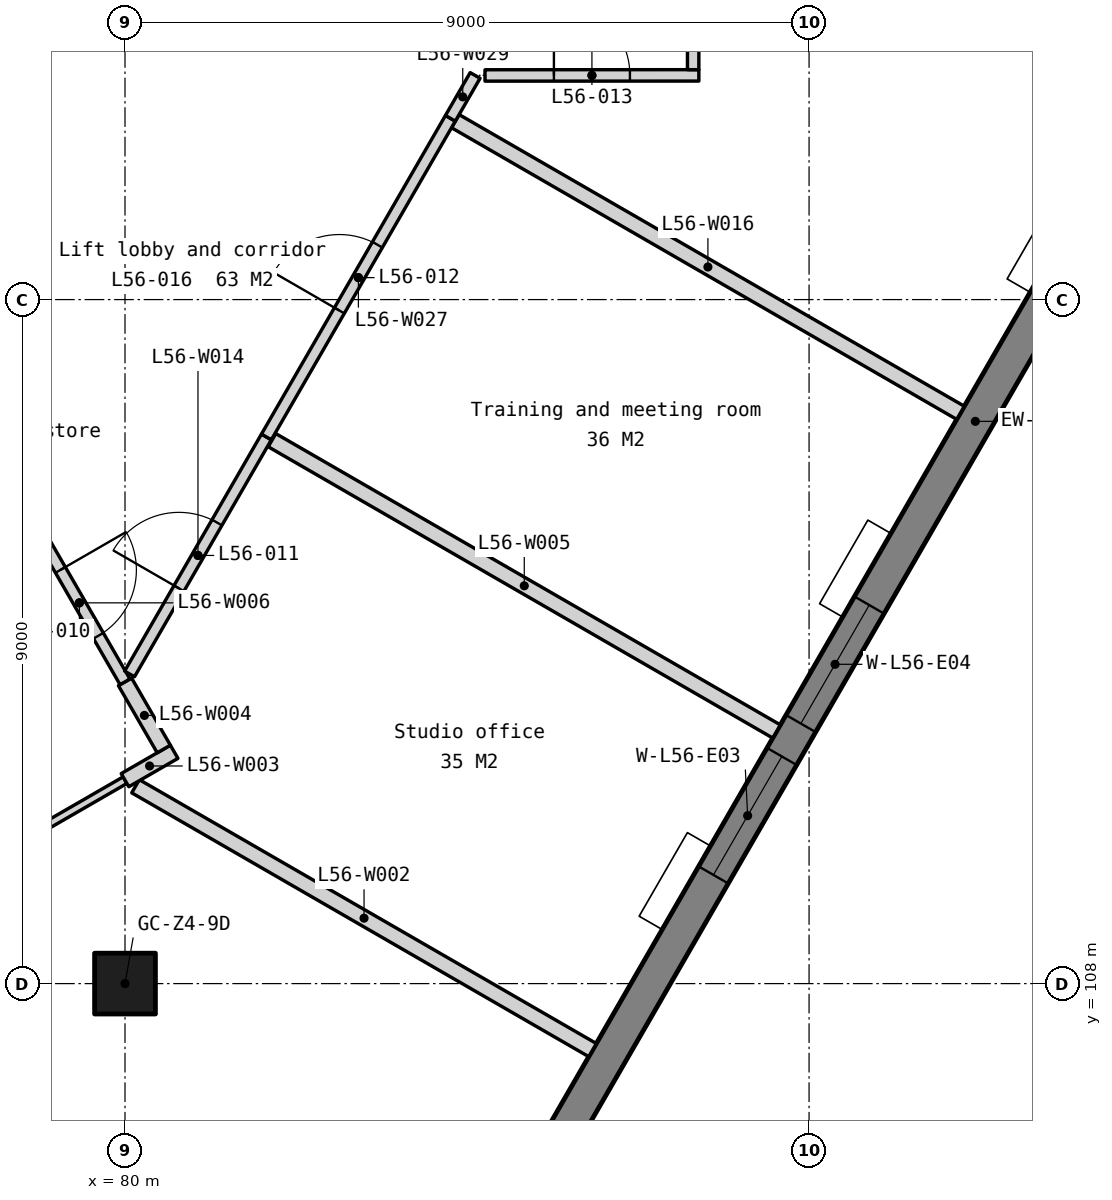
"""IFC4 building model, lengths in metres.
Left out: names, types, materials, properties, quantities, classifications, styles, units other than length and angle.
Written with IfcOpenShell. Run it as: python <this file> out.ifc"""

import sys

from ifc_helpers import new_model, si_unit, direction, frame, frame_2d, origin, origin_2d, place, context, subcontext, project, spatial, polyline, rectangle, outline, extrude, element, fill, save


model = new_model("IFC4")
c1 = context("Model", 3, precision=1e-05, world=origin(), true_north=direction((0.0, 1.0)))
c2 = subcontext(c1, "Body", "Model", "MODEL_VIEW")
j1 = project(units=[si_unit("LENGTHUNIT", "METRE"), si_unit("PLANEANGLEUNIT", "RADIAN")], contexts=[c1])
p1 = place(None, origin())
s1 = spatial("IfcSite", under=j1, at=p1, CompositionType="ELEMENT")
p2 = place(p1, origin())
s2 = spatial("IfcBuilding", under=s1, at=p2, CompositionType="ELEMENT")
p3 = place(p2, frame((0.0, 0.0, 223.1)))
s3 = spatial("IfcBuildingStorey", under=s2, at=p3, CompositionType="ELEMENT", Elevation=223.1)
p4 = place(p3, frame((80.0, 108.0, 0.0), z_axis=(0.0, 0.0, 1.0), x_axis=(1.0, 0.0, 0.0)))
e1 = element("IfcColumn", 1, at=p4, inside=s3, PredefinedType="COLUMN", context=c2, shape_type="SweptSolid", body=[
    extrude(rectangle(XDim=0.8, YDim=0.8, at=origin_2d()), origin(), (0.0, 0.0, 1.0), 3.9),
])
p5 = place(p3, frame((81.505, 98.627, -0.15), z_axis=(0.0, 0.0, 1.0), x_axis=(0.500002199942, 0.866024133644, 0.0)))
e2 = element("IfcWall", 2, at=p5, inside=s3, PredefinedType="SOLIDWALL", context=c2, shape_type="SweptSolid", body=[
    extrude(outline(polyline([(38.729, 0.0), (38.729, 3.75), (0.0, 3.75), (0.0, 0.0), (38.729, 0.0)])), frame((0.0, 0.225, 0.0), z_axis=(0.0, -1.0, 0.0), x_axis=(1.0, 0.0, 0.0)), (0.0, 0.0, 1.0), 0.45),
])
p6 = place(p5, frame((2.791, 0.0, 0.95)))
e3 = element("IfcOpeningElement", 3, at=p6, cuts=e2, PredefinedType="OPENING", context=c2, shape_type="SweptSolid", body=[
    extrude(rectangle(XDim=1.8, YDim=2.2, at=frame_2d((0.9, 1.1))), frame((0.0, 0.235, 0.0), z_axis=(0.0, -1.0, 0.0), x_axis=(1.0, 0.0, 0.0)), (0.0, 0.0, 1.0), 0.47),
])
p7 = place(p5, frame((5.091, 0.0, 0.95)))
e4 = element("IfcOpeningElement", 4, at=p7, cuts=e2, PredefinedType="OPENING", context=c2, shape_type="SweptSolid", body=[
    extrude(rectangle(XDim=1.8, YDim=2.2, at=frame_2d((0.9, 1.1))), frame((0.0, 0.235, 0.0), z_axis=(0.0, -1.0, 0.0), x_axis=(1.0, 0.0, 0.0)), (0.0, 0.0, 1.0), 0.47),
])
p8 = place(p5, frame((12.473, 0.0, 0.95)))
e5 = element("IfcOpeningElement", 5, at=p8, cuts=e2, PredefinedType="OPENING", context=c2, shape_type="SweptSolid", body=[
    extrude(rectangle(XDim=1.8, YDim=2.2, at=frame_2d((0.9, 1.1))), frame((0.0, 0.235, 0.0), z_axis=(0.0, -1.0, 0.0), x_axis=(1.0, 0.0, 0.0)), (0.0, 0.0, 1.0), 0.47),
])
p9 = place(p5, frame((14.773, 0.0, 0.95)))
e6 = element("IfcOpeningElement", 6, at=p9, cuts=e2, PredefinedType="OPENING", context=c2, shape_type="SweptSolid", body=[
    extrude(rectangle(XDim=1.8, YDim=2.2, at=frame_2d((0.9, 1.1))), frame((0.0, 0.235, 0.0), z_axis=(0.0, -1.0, 0.0), x_axis=(1.0, 0.0, 0.0)), (0.0, 0.0, 1.0), 0.47),
])
p10 = place(p5, frame((22.156, 0.0, 0.95)))
e7 = element("IfcOpeningElement", 7, at=p10, cuts=e2, PredefinedType="OPENING", context=c2, shape_type="SweptSolid", body=[
    extrude(rectangle(XDim=1.8, YDim=2.2, at=frame_2d((0.9, 1.1))), frame((0.0, 0.235, 0.0), z_axis=(0.0, -1.0, 0.0), x_axis=(1.0, 0.0, 0.0)), (0.0, 0.0, 1.0), 0.47),
])
p11 = place(p5, frame((24.456, 0.0, 0.95)))
e8 = element("IfcOpeningElement", 8, at=p11, cuts=e2, PredefinedType="OPENING", context=c2, shape_type="SweptSolid", body=[
    extrude(rectangle(XDim=1.8, YDim=2.2, at=frame_2d((0.9, 1.1))), frame((0.0, 0.235, 0.0), z_axis=(0.0, -1.0, 0.0), x_axis=(1.0, 0.0, 0.0)), (0.0, 0.0, 1.0), 0.47),
])
p12 = place(p5, frame((31.838, 0.0, 0.95)))
e9 = element("IfcOpeningElement", 9, at=p12, cuts=e2, PredefinedType="OPENING", context=c2, shape_type="SweptSolid", body=[
    extrude(rectangle(XDim=1.8, YDim=2.2, at=frame_2d((0.9, 1.1))), frame((0.0, 0.235, 0.0), z_axis=(0.0, -1.0, 0.0), x_axis=(1.0, 0.0, 0.0)), (0.0, 0.0, 1.0), 0.47),
])
p13 = place(p5, frame((34.138, 0.0, 0.95)))
e10 = element("IfcOpeningElement", 10, at=p13, cuts=e2, PredefinedType="OPENING", context=c2, shape_type="SweptSolid", body=[
    extrude(rectangle(XDim=1.8, YDim=2.2, at=frame_2d((0.9, 1.1))), frame((0.0, 0.235, 0.0), z_axis=(0.0, -1.0, 0.0), x_axis=(1.0, 0.0, 0.0)), (0.0, 0.0, 1.0), 0.47),
])
p14 = place(p3, frame((73.849, 107.125, 0.0), z_axis=(0.0, 0.0, 1.0), x_axis=(0.866024174161, 0.500002129764, 0.0)))
e11 = element("IfcWall", 11, at=p14, inside=s3, PredefinedType="PARTITIONING", context=c2, shape_type="SweptSolid", body=[
    extrude(rectangle(XDim=7.103, YDim=0.1, at=frame_2d((3.552, 0.0))), origin(), (0.0, 0.0, 1.0), 3.6),
])
p15 = place(p14, frame((3.102, 0.0, 0.0)))
e12 = element("IfcOpeningElement", 12, at=p15, cuts=e11, PredefinedType="OPENING", context=c2, shape_type="SweptSolid", body=[
    extrude(rectangle(XDim=0.9, YDim=2.1, at=frame_2d((0.45, 1.05))), frame((0.0, 0.06, 0.0), z_axis=(0.0, -1.0, 0.0), x_axis=(1.0, 0.0, 0.0)), (0.0, 0.0, 1.0), 0.12),
])
p16 = place(p3, frame((80.139, 110.597, 0.0), z_axis=(0.0, 0.0, 1.0), x_axis=(0.866025136247, -0.500000463387, 0.0)))
e13 = element("IfcWall", 13, at=p16, inside=s3, PredefinedType="PARTITIONING", context=c2, shape_type="SweptSolid", body=[
    extrude(rectangle(XDim=6.943, YDim=0.2, at=frame_2d((3.471, 0.0))), origin(), (0.0, 0.0, 1.0), 3.6),
])
p17 = place(p3, frame((80.0, 110.677, 0.0), z_axis=(0.0, 0.0, 1.0), x_axis=(0.866163819127, 0.499760180923, 0.0)))
e14 = element("IfcWall", 14, at=p17, inside=s3, PredefinedType="PARTITIONING", context=c2, shape_type="SweptSolid", body=[
    extrude(rectangle(XDim=0.747, YDim=0.2, at=frame_2d((0.374, 0.0))), origin(), (0.0, 0.0, 1.0), 3.6),
])
p18 = place(p3, frame((80.0, 111.97, 0.0), z_axis=(0.0, 0.0, 1.0), x_axis=(0.499998569178, -0.866026229868, 0.0)))
e15 = element("IfcWall", 15, at=p18, inside=s3, PredefinedType="PARTITIONING", context=c2, shape_type="SweptSolid", body=[
    extrude(rectangle(XDim=1.021, YDim=0.2, at=frame_2d((0.51, 0.0))), origin(), (0.0, 0.0, 1.0), 3.6),
])
p19 = place(p3, frame((81.934, 115.15, 0.0), z_axis=(0.0, 0.0, 1.0), x_axis=(0.866027525232, -0.499996325527, 0.0)))
e16 = element("IfcWall", 16, at=p19, inside=s3, PredefinedType="PARTITIONING", context=c2, shape_type="SweptSolid", body=[
    extrude(rectangle(XDim=7.665, YDim=0.2, at=frame_2d((3.833, 0.0))), origin(), (0.0, 0.0, 1.0), 3.6),
])
p20 = place(p3, frame((78.8, 114.049, 0.0), z_axis=(0.0, 0.0, 1.0), x_axis=(0.500001309137, -0.866024647952, 0.0)))
e17 = element("IfcWall", 17, at=p20, inside=s3, PredefinedType="PARTITIONING", context=c2, shape_type="SweptSolid", body=[
    extrude(rectangle(XDim=2.4, YDim=0.15, at=frame_2d((1.2, 0.0))), origin(), (0.0, 0.0, 1.0), 3.6),
])
p21 = place(p20, frame((0.7, 0.0, 0.0)))
e18 = element("IfcOpeningElement", 18, at=p21, cuts=e17, PredefinedType="OPENING", context=c2, shape_type="SweptSolid", body=[
    extrude(rectangle(XDim=1.0, YDim=2.1, at=frame_2d((0.5, 1.05))), frame((0.0, 0.085, 0.0), z_axis=(0.0, -1.0, 0.0), x_axis=(1.0, 0.0, 0.0)), (0.0, 0.0, 1.0), 0.17),
])
p22 = place(p3, frame((80.06, 112.074, 0.0), z_axis=(0.0, 0.0, 1.0), x_axis=(0.500004188491, 0.866022985545, 0.0)))
e19 = element("IfcWall", 19, at=p22, inside=s3, PredefinedType="PARTITIONING", context=c2, shape_type="SweptSolid", body=[
    extrude(rectangle(XDim=3.601, YDim=0.15, at=frame_2d((1.8, 0.0))), origin(), (0.0, 0.0, 1.0), 3.6),
])
p23 = place(p22, frame((1.3, 0.0, 0.0)))
e20 = element("IfcOpeningElement", 20, at=p23, cuts=e19, PredefinedType="OPENING", context=c2, shape_type="SweptSolid", body=[
    extrude(rectangle(XDim=1.0, YDim=2.1, at=frame_2d((0.5, 1.05))), frame((0.0, 0.085, 0.0), z_axis=(0.0, -1.0, 0.0), x_axis=(1.0, 0.0, 0.0)), (0.0, 0.0, 1.0), 0.17),
])
p24 = place(p3, frame((84.346, 119.348, 0.0), z_axis=(0.0, 0.0, 1.0), x_axis=(0.866030377306, -0.499991385509, 0.0)))
e21 = element("IfcWall", 21, at=p24, inside=s3, PredefinedType="PARTITIONING", context=c2, shape_type="SweptSolid", body=[
    extrude(rectangle(XDim=7.675, YDim=0.2, at=frame_2d((3.837, 0.0))), origin(), (0.0, 0.0, 1.0), 3.6),
])
p25 = place(p3, frame((81.86, 115.193, 0.0), z_axis=(0.0, 0.0, 1.0), x_axis=(0.500006196252, 0.866021826347, 0.0)))
e22 = element("IfcWall", 22, at=p25, inside=s3, PredefinedType="PARTITIONING", context=c2, shape_type="SweptSolid", body=[
    extrude(rectangle(XDim=4.841, YDim=0.15, at=frame_2d((2.421, 0.0))), origin(), (0.0, 0.0, 1.0), 3.6),
])
p26 = place(p25, frame((1.921, 0.0, 0.0)))
e23 = element("IfcOpeningElement", 23, at=p26, cuts=e22, PredefinedType="OPENING", context=c2, shape_type="SweptSolid", body=[
    extrude(rectangle(XDim=1.0, YDim=2.1, at=frame_2d((0.5, 1.05))), frame((0.0, 0.085, 0.0), z_axis=(0.0, -1.0, 0.0), x_axis=(1.0, 0.0, 0.0)), (0.0, 0.0, 1.0), 0.17),
])
p27 = place(p3, frame((84.281, 119.385, 0.0), z_axis=(0.0, 0.0, 1.0), x_axis=(0.499971370958, 0.866041932139, 0.0)))
e24 = element("IfcWall", 24, at=p27, inside=s3, PredefinedType="PARTITIONING", context=c2, shape_type="SweptSolid", body=[
    extrude(rectangle(XDim=0.651, YDim=0.15, at=frame_2d((0.325, 0.0))), origin(), (0.0, 0.0, 1.0), 3.6),
])
p28 = place(p3, frame((84.736, 119.949, 0.0), z_axis=(0.0, 0.0, 1.0), x_axis=(0.999999939771, 0.000347071563, 0.0)))
e25 = element("IfcWall", 25, at=p28, inside=s3, PredefinedType="PARTITIONING", context=c2, shape_type="SweptSolid", body=[
    extrude(rectangle(XDim=2.814, YDim=0.15, at=frame_2d((1.407, 0.0))), origin(), (0.0, 0.0, 1.0), 3.6),
])
p29 = place(p28, frame((0.907, 0.0, 0.0)))
e26 = element("IfcOpeningElement", 26, at=p29, cuts=e25, PredefinedType="OPENING", context=c2, shape_type="SweptSolid", body=[
    extrude(rectangle(XDim=1.0, YDim=2.1, at=frame_2d((0.5, 1.05))), frame((0.0, 0.085, 0.0), z_axis=(0.0, -1.0, 0.0), x_axis=(1.0, 0.0, 0.0)), (0.0, 0.0, 1.0), 0.17),
])
p30 = place(p3, frame((87.475, 120.025, 0.0), z_axis=(0.0, 0.0, 1.0), x_axis=(9.6683747e-05, 0.999999995326, 0.0)))
e27 = element("IfcWall", 27, at=p30, inside=s3, PredefinedType="PARTITIONING", context=c2, shape_type="SweptSolid", body=[
    extrude(rectangle(XDim=2.525, YDim=0.15, at=frame_2d((1.263, 0.0))), origin(), (0.0, 0.0, 1.0), 3.6),
])
p31 = place(p8, origin())
e28 = element("IfcWindow", 28, at=p31, inside=s3, PartitioningType="SINGLE_PANEL", PredefinedType="WINDOW", context=c2, shape_type="SweptSolid", body=[
    extrude(rectangle(XDim=1.8, YDim=2.2, at=frame_2d((0.9, 1.1))), frame((0.0, 0.03, 0.0), z_axis=(0.0, -1.0, 0.0), x_axis=(1.0, 0.0, 0.0)), (0.0, 0.0, 1.0), 0.06),
])
fill(e5, e28)
p32 = place(p9, origin())
e29 = element("IfcWindow", 29, at=p32, inside=s3, PartitioningType="SINGLE_PANEL", PredefinedType="WINDOW", context=c2, shape_type="SweptSolid", body=[
    extrude(rectangle(XDim=1.8, YDim=2.2, at=frame_2d((0.9, 1.1))), frame((0.0, 0.03, 0.0), z_axis=(0.0, -1.0, 0.0), x_axis=(1.0, 0.0, 0.0)), (0.0, 0.0, 1.0), 0.06),
])
fill(e6, e29)
p33 = place(p21, origin())
e30 = element("IfcDoor", 30, at=p33, inside=s3, OperationType="SINGLE_SWING_LEFT", PredefinedType="DOOR", context=c2, shape_type="SweptSolid", body=[
    extrude(rectangle(XDim=1.0, YDim=2.1, at=frame_2d((0.5, 1.05))), frame((0.0, 0.025, 0.0), z_axis=(0.0, -1.0, 0.0), x_axis=(1.0, 0.0, 0.0)), (0.0, 0.0, 1.0), 0.05),
])
fill(e18, e30)
p34 = place(p23, origin())
e31 = element("IfcDoor", 31, at=p34, inside=s3, OperationType="SINGLE_SWING_LEFT", PredefinedType="DOOR", context=c2, shape_type="SweptSolid", body=[
    extrude(rectangle(XDim=1.0, YDim=2.1, at=frame_2d((0.5, 1.05))), frame((0.0, 0.025, 0.0), z_axis=(0.0, -1.0, 0.0), x_axis=(1.0, 0.0, 0.0)), (0.0, 0.0, 1.0), 0.05),
])
fill(e20, e31)
p35 = place(p26, origin())
e32 = element("IfcDoor", 32, at=p35, inside=s3, OperationType="SINGLE_SWING_LEFT", PredefinedType="DOOR", context=c2, shape_type="SweptSolid", body=[
    extrude(rectangle(XDim=1.0, YDim=2.1, at=frame_2d((0.5, 1.05))), frame((0.0, 0.025, 0.0), z_axis=(0.0, -1.0, 0.0), x_axis=(1.0, 0.0, 0.0)), (0.0, 0.0, 1.0), 0.05),
])
fill(e23, e32)
p36 = place(p29, origin())
e33 = element("IfcDoor", 33, at=p36, inside=s3, OperationType="SINGLE_SWING_LEFT", PredefinedType="DOOR", context=c2, shape_type="SweptSolid", body=[
    extrude(rectangle(XDim=1.0, YDim=2.1, at=frame_2d((0.5, 1.05))), frame((0.0, 0.025, 0.0), z_axis=(0.0, -1.0, 0.0), x_axis=(1.0, 0.0, 0.0)), (0.0, 0.0, 1.0), 0.05),
])
fill(e26, e33)
save(model, sys.argv[1])
